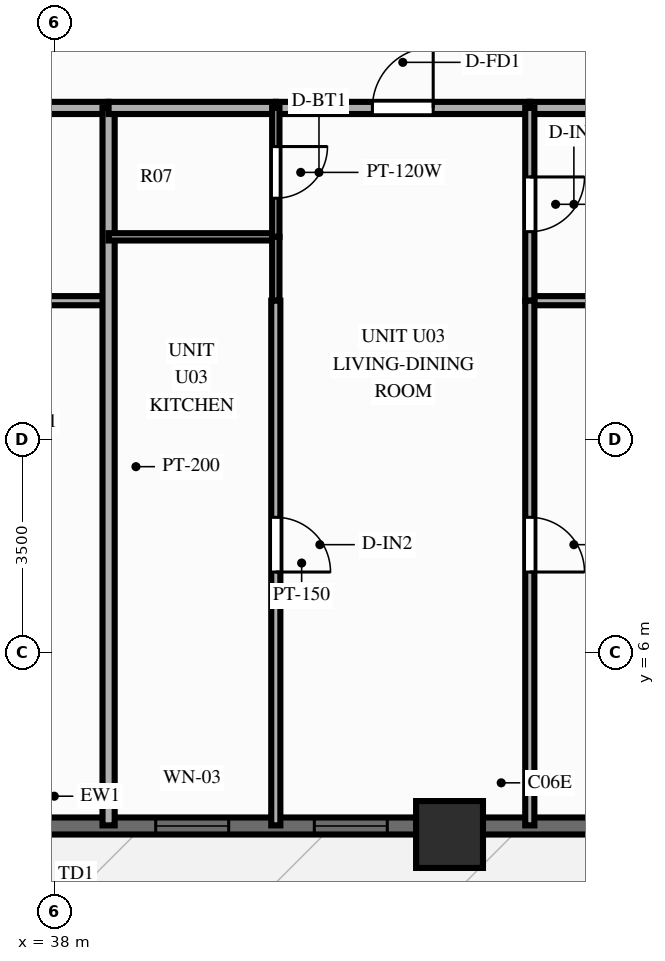
"""IFC4 building model, lengths in metres.
Left out: names, types, materials, properties, quantities, classifications, styles, units other than length and angle.
Written with IfcOpenShell. Run it as: python <this file> out.ifc"""

import sys

from ifc_helpers import new_model, si_unit, direction, frame, frame_2d, origin, origin_2d, place, context, subcontext, project, spatial, rectangle, extrude, source, transform, mapped, element, fill, save


model = new_model("IFC4")
c1 = context("Model", 3, precision=1e-05, world=origin(), true_north=direction((0.0, 1.0)))
c2 = subcontext(c1, "Body", "Model", "MODEL_VIEW")
j1 = project(units=[si_unit("LENGTHUNIT", "METRE"), si_unit("PLANEANGLEUNIT", "RADIAN")], contexts=[c1])
p1 = place(None, origin())
s1 = spatial("IfcSite", under=j1, at=p1, CompositionType="ELEMENT")
p2 = place(p1, origin())
s2 = spatial("IfcBuilding", under=s1, at=p2, CompositionType="ELEMENT")
p3 = place(p2, frame((0.0, 0.0, 34.4)))
s3 = spatial("IfcBuildingStorey", under=s2, at=p3, CompositionType="ELEMENT", Elevation=34.4)
m1 = source(origin(), c2, "Body", "SweptSolid", [
    extrude(rectangle(XDim=1.1, YDim=1.1, at=origin_2d()), origin(), (0.0, 0.0, 1.0), 3.0),
])
p4 = place(p3, frame((44.5, 3.0, 0.0), z_axis=(0.0, 0.0, 1.0), x_axis=(1.0, 0.0, 0.0)))
e1 = element("IfcColumn", 1, at=p4, inside=s3, PredefinedType="COLUMN", context=c2, shape_type="MappedRepresentation", body=[
    mapped(m1, transform((0.0, 0.0, 0.0), scale=1.0)),
])
p5 = place(p3, frame((15.5, 3.14, 0.0), z_axis=(0.0, 0.0, 1.0), x_axis=(1.0, 0.0, 0.0)))
e2 = element("IfcWall", 2, at=p5, inside=s3, PredefinedType="SOLIDWALL", context=c2, shape_type="SweptSolid", body=[
    extrude(rectangle(XDim=45.0, YDim=0.28, at=frame_2d((22.5, 0.0))), origin(), (0.0, 0.0, 1.0), 2.28),
])
p6 = place(p5, frame((1.06, 0.0, 0.25)))
e3 = element("IfcOpeningElement", 3, at=p6, cuts=e2, PredefinedType="OPENING", context=c2, shape_type="SweptSolid", body=[
    extrude(rectangle(XDim=1.2, YDim=1.5, at=frame_2d((0.6, 0.75))), frame((0.0, 0.152, 0.0), z_axis=(0.0, -1.0, 0.0), x_axis=(1.0, 0.0, 0.0)), (0.0, 0.0, 1.0), 0.304),
])
p7 = place(p5, frame((4.875, 0.0, 0.25)))
e4 = element("IfcOpeningElement", 4, at=p7, cuts=e2, PredefinedType="OPENING", context=c2, shape_type="SweptSolid", body=[
    extrude(rectangle(XDim=1.2, YDim=1.5, at=frame_2d((0.6, 0.75))), frame((0.0, 0.152, 0.0), z_axis=(0.0, -1.0, 0.0), x_axis=(1.0, 0.0, 0.0)), (0.0, 0.0, 1.0), 0.304),
])
p8 = place(p5, frame((9.303, 0.0, 0.25)))
e5 = element("IfcOpeningElement", 5, at=p8, cuts=e2, PredefinedType="OPENING", context=c2, shape_type="SweptSolid", body=[
    extrude(rectangle(XDim=1.2, YDim=1.5, at=frame_2d((0.6, 0.75))), frame((0.0, 0.152, 0.0), z_axis=(0.0, -1.0, 0.0), x_axis=(1.0, 0.0, 0.0)), (0.0, 0.0, 1.0), 0.304),
])
p9 = place(p5, frame((13.098, 0.0, 0.25)))
e6 = element("IfcOpeningElement", 6, at=p9, cuts=e2, PredefinedType="OPENING", context=c2, shape_type="SweptSolid", body=[
    extrude(rectangle(XDim=1.2, YDim=1.5, at=frame_2d((0.6, 0.75))), frame((0.0, 0.152, 0.0), z_axis=(0.0, -1.0, 0.0), x_axis=(1.0, 0.0, 0.0)), (0.0, 0.0, 1.0), 0.304),
])
p10 = place(p5, frame((17.408, 0.0, 0.25)))
e7 = element("IfcOpeningElement", 7, at=p10, cuts=e2, PredefinedType="OPENING", context=c2, shape_type="SweptSolid", body=[
    extrude(rectangle(XDim=1.2, YDim=1.5, at=frame_2d((0.6, 0.75))), frame((0.0, 0.152, 0.0), z_axis=(0.0, -1.0, 0.0), x_axis=(1.0, 0.0, 0.0)), (0.0, 0.0, 1.0), 0.304),
])
p11 = place(p5, frame((22.06, 0.0, 0.0), z_axis=(0.0, 0.0, 1.0), x_axis=(-1.0, 0.0, 0.0)))
e8 = element("IfcOpeningElement", 8, at=p11, cuts=e2, PredefinedType="OPENING", context=c2, shape_type="SweptSolid", body=[
    extrude(rectangle(XDim=1.1, YDim=2.15, at=frame_2d((0.55, 1.075))), frame((0.0, 0.152, 0.0), z_axis=(0.0, -1.0, 0.0), x_axis=(1.0, 0.0, 0.0)), (0.0, 0.0, 1.0), 0.304),
])
p12 = place(p5, frame((24.168, 0.0, 0.25)))
e9 = element("IfcOpeningElement", 9, at=p12, cuts=e2, PredefinedType="OPENING", context=c2, shape_type="SweptSolid", body=[
    extrude(rectangle(XDim=1.2, YDim=1.5, at=frame_2d((0.6, 0.75))), frame((0.0, 0.152, 0.0), z_axis=(0.0, -1.0, 0.0), x_axis=(1.0, 0.0, 0.0)), (0.0, 0.0, 1.0), 0.304),
])
p13 = place(p5, frame((26.776, 0.0, 0.25)))
e10 = element("IfcOpeningElement", 10, at=p13, cuts=e2, PredefinedType="OPENING", context=c2, shape_type="SweptSolid", body=[
    extrude(rectangle(XDim=1.2, YDim=1.5, at=frame_2d((0.6, 0.75))), frame((0.0, 0.152, 0.0), z_axis=(0.0, -1.0, 0.0), x_axis=(1.0, 0.0, 0.0)), (0.0, 0.0, 1.0), 0.304),
])
p14 = place(p5, frame((31.613, 0.0, 0.25)))
e11 = element("IfcOpeningElement", 11, at=p14, cuts=e2, PredefinedType="OPENING", context=c2, shape_type="SweptSolid", body=[
    extrude(rectangle(XDim=1.2, YDim=1.5, at=frame_2d((0.6, 0.75))), frame((0.0, 0.152, 0.0), z_axis=(0.0, -1.0, 0.0), x_axis=(1.0, 0.0, 0.0)), (0.0, 0.0, 1.0), 0.304),
])
p15 = place(p5, frame((34.881, 0.0, 0.25)))
e12 = element("IfcOpeningElement", 12, at=p15, cuts=e2, PredefinedType="OPENING", context=c2, shape_type="SweptSolid", body=[
    extrude(rectangle(XDim=1.2, YDim=1.5, at=frame_2d((0.6, 0.75))), frame((0.0, 0.152, 0.0), z_axis=(0.0, -1.0, 0.0), x_axis=(1.0, 0.0, 0.0)), (0.0, 0.0, 1.0), 0.304),
])
p16 = place(p5, frame((38.355, 0.0, 0.25)))
e13 = element("IfcOpeningElement", 13, at=p16, cuts=e2, PredefinedType="OPENING", context=c2, shape_type="SweptSolid", body=[
    extrude(rectangle(XDim=1.2, YDim=1.5, at=frame_2d((0.6, 0.75))), frame((0.0, 0.152, 0.0), z_axis=(0.0, -1.0, 0.0), x_axis=(1.0, 0.0, 0.0)), (0.0, 0.0, 1.0), 0.304),
])
p17 = place(p5, frame((42.232, 0.0, 0.25)))
e14 = element("IfcOpeningElement", 14, at=p17, cuts=e2, PredefinedType="OPENING", context=c2, shape_type="SweptSolid", body=[
    extrude(rectangle(XDim=1.2, YDim=1.5, at=frame_2d((0.6, 0.75))), frame((0.0, 0.152, 0.0), z_axis=(0.0, -1.0, 0.0), x_axis=(1.0, 0.0, 0.0)), (0.0, 0.0, 1.0), 0.304),
])
p18 = place(p3, frame((35.127, 14.95, 0.0), z_axis=(0.0, 0.0, 1.0), x_axis=(1.0, 0.0, 0.0)))
e15 = element("IfcWall", 15, at=p18, inside=s3, PredefinedType="PARTITIONING", context=c2, shape_type="SweptSolid", body=[
    extrude(rectangle(XDim=3.766, YDim=0.2, at=frame_2d((1.883, 0.0))), origin(), (0.0, 0.0, 1.0), 2.79),
])
p19 = place(p3, frame((35.127, 11.78, 0.0), z_axis=(0.0, 0.0, 1.0), x_axis=(1.0, 0.0, 0.0)))
e16 = element("IfcWall", 16, at=p19, inside=s3, PredefinedType="PARTITIONING", context=c2, shape_type="SweptSolid", body=[
    extrude(rectangle(XDim=3.766, YDim=0.15, at=frame_2d((1.883, 0.0))), origin(), (0.0, 0.0, 1.0), 2.79),
])
p20 = place(p3, frame((38.893, 14.95, 0.0), z_axis=(0.0, 0.0, 1.0), x_axis=(0.0, -1.0, 0.0)))
e17 = element("IfcWall", 17, at=p20, inside=s3, PredefinedType="PARTITIONING", context=c2, shape_type="SweptSolid", body=[
    extrude(rectangle(XDim=11.8, YDim=0.2, at=frame_2d((5.9, 0.0))), origin(), (0.0, 0.0, 1.0), 2.79),
])
p21 = place(p3, frame((38.893, 14.95, 0.0), z_axis=(0.0, 0.0, 1.0), x_axis=(1.0, 0.0, 0.0)))
e18 = element("IfcWall", 18, at=p21, inside=s3, PredefinedType="PARTITIONING", context=c2, shape_type="SweptSolid", body=[
    extrude(rectangle(XDim=2.75, YDim=0.2, at=frame_2d((1.375, 0.0))), origin(), (0.0, 0.0, 1.0), 2.79),
])
p22 = place(p3, frame((41.643, 14.95, 0.0), z_axis=(0.0, 0.0, 1.0), x_axis=(1.0, 0.0, 0.0)))
e19 = element("IfcWall", 19, at=p22, inside=s3, PredefinedType="PARTITIONING", context=c2, shape_type="SweptSolid", body=[
    extrude(rectangle(XDim=4.177, YDim=0.2, at=frame_2d((2.089, 0.0))), origin(), (0.0, 0.0, 1.0), 2.79),
])
p23 = place(p22, frame((1.589, 0.0, 0.0)))
e20 = element("IfcOpeningElement", 20, at=p23, cuts=e19, PredefinedType="OPENING", context=c2, shape_type="SweptSolid", body=[
    extrude(rectangle(XDim=1.0, YDim=2.15, at=frame_2d((0.5, 1.075))), frame((0.0, 0.112, 0.0), z_axis=(0.0, -1.0, 0.0), x_axis=(1.0, 0.0, 0.0)), (0.0, 0.0, 1.0), 0.224),
])
p24 = place(p3, frame((45.82, 14.95, 0.0), z_axis=(0.0, 0.0, 1.0), x_axis=(1.0, 0.0, 0.0)))
e21 = element("IfcWall", 21, at=p24, inside=s3, PredefinedType="PARTITIONING", context=c2, shape_type="SweptSolid", body=[
    extrude(rectangle(XDim=3.786, YDim=0.2, at=frame_2d((1.893, 0.0))), origin(), (0.0, 0.0, 1.0), 2.79),
])
p25 = place(p3, frame((38.893, 12.83, 0.0), z_axis=(0.0, 0.0, 1.0), x_axis=(1.0, 0.0, 0.0)))
e22 = element("IfcWall", 22, at=p25, inside=s3, PredefinedType="PARTITIONING", context=c2, shape_type="SweptSolid", body=[
    extrude(rectangle(XDim=2.75, YDim=0.12, at=frame_2d((1.375, 0.0))), origin(), (0.0, 0.0, 1.0), 2.79),
])
p26 = place(p3, frame((45.82, 11.78, 0.0), z_axis=(0.0, 0.0, 1.0), x_axis=(1.0, 0.0, 0.0)))
e23 = element("IfcWall", 23, at=p26, inside=s3, PredefinedType="PARTITIONING", context=c2, shape_type="SweptSolid", body=[
    extrude(rectangle(XDim=3.786, YDim=0.15, at=frame_2d((1.893, 0.0))), origin(), (0.0, 0.0, 1.0), 2.79),
])
p27 = place(p3, frame((41.643, 14.95, 0.0), z_axis=(0.0, 0.0, 1.0), x_axis=(0.0, -1.0, 0.0)))
e24 = element("IfcWall", 24, at=p27, inside=s3, PredefinedType="PARTITIONING", context=c2, shape_type="SweptSolid", body=[
    extrude(rectangle(XDim=2.12, YDim=0.12, at=frame_2d((1.06, 0.0))), origin(), (0.0, 0.0, 1.0), 2.79),
])
p28 = place(p27, frame((0.635, 0.0, 0.0)))
e25 = element("IfcOpeningElement", 25, at=p28, cuts=e24, PredefinedType="OPENING", context=c2, shape_type="SweptSolid", body=[
    extrude(rectangle(XDim=0.85, YDim=2.05, at=frame_2d((0.425, 1.025))), frame((0.0, 0.072, 0.0), z_axis=(0.0, -1.0, 0.0), x_axis=(1.0, 0.0, 0.0)), (0.0, 0.0, 1.0), 0.144),
])
p29 = place(p3, frame((41.643, 12.83, 0.0), z_axis=(0.0, 0.0, 1.0), x_axis=(0.0, -1.0, 0.0)))
e26 = element("IfcWall", 26, at=p29, inside=s3, PredefinedType="PARTITIONING", context=c2, shape_type="SweptSolid", body=[
    extrude(rectangle(XDim=1.05, YDim=0.12, at=frame_2d((0.525, 0.0))), origin(), (0.0, 0.0, 1.0), 2.79),
])
p30 = place(p3, frame((41.643, 11.78, 0.0), z_axis=(0.0, 0.0, 1.0), x_axis=(0.0, -1.0, 0.0)))
e27 = element("IfcWall", 27, at=p30, inside=s3, PredefinedType="PARTITIONING", context=c2, shape_type="SweptSolid", body=[
    extrude(rectangle(XDim=8.63, YDim=0.15, at=frame_2d((4.315, 0.0))), origin(), (0.0, 0.0, 1.0), 2.79),
])
p31 = place(p30, frame((3.563, 0.0, 0.0)))
e28 = element("IfcOpeningElement", 28, at=p31, cuts=e27, PredefinedType="OPENING", context=c2, shape_type="SweptSolid", body=[
    extrude(rectangle(XDim=0.9, YDim=2.1, at=frame_2d((0.45, 1.05))), frame((0.0, 0.087, 0.0), z_axis=(0.0, -1.0, 0.0), x_axis=(1.0, 0.0, 0.0)), (0.0, 0.0, 1.0), 0.174),
])
p32 = place(p3, frame((45.82, 14.95, 0.0), z_axis=(0.0, 0.0, 1.0), x_axis=(0.0, -1.0, 0.0)))
e29 = element("IfcWall", 29, at=p32, inside=s3, PredefinedType="PARTITIONING", context=c2, shape_type="SweptSolid", body=[
    extrude(rectangle(XDim=3.17, YDim=0.15, at=frame_2d((1.585, 0.0))), origin(), (0.0, 0.0, 1.0), 2.79),
])
p33 = place(p32, frame((1.135, 0.0, 0.0)))
e30 = element("IfcOpeningElement", 30, at=p33, cuts=e29, PredefinedType="OPENING", context=c2, shape_type="SweptSolid", body=[
    extrude(rectangle(XDim=0.9, YDim=2.1, at=frame_2d((0.45, 1.05))), frame((0.0, 0.087, 0.0), z_axis=(0.0, -1.0, 0.0), x_axis=(1.0, 0.0, 0.0)), (0.0, 0.0, 1.0), 0.174),
])
p34 = place(p3, frame((45.82, 11.78, 0.0), z_axis=(0.0, 0.0, 1.0), x_axis=(0.0, -1.0, 0.0)))
e31 = element("IfcWall", 31, at=p34, inside=s3, PredefinedType="PARTITIONING", context=c2, shape_type="SweptSolid", body=[
    extrude(rectangle(XDim=8.63, YDim=0.15, at=frame_2d((4.315, 0.0))), origin(), (0.0, 0.0, 1.0), 2.79),
])
p35 = place(p34, frame((3.563, 0.0, 0.0)))
e32 = element("IfcOpeningElement", 32, at=p35, cuts=e31, PredefinedType="OPENING", context=c2, shape_type="SweptSolid", body=[
    extrude(rectangle(XDim=0.9, YDim=2.1, at=frame_2d((0.45, 1.05))), frame((0.0, 0.087, 0.0), z_axis=(0.0, -1.0, 0.0), x_axis=(1.0, 0.0, 0.0)), (0.0, 0.0, 1.0), 0.174),
])
m2 = source(origin(), c2, "Body", "SweptSolid", [
    extrude(rectangle(XDim=1.2, YDim=1.5, at=frame_2d((0.6, 0.75))), frame((0.0, 0.03, 0.0), z_axis=(0.0, -1.0, 0.0), x_axis=(1.0, 0.0, 0.0)), (0.0, 0.0, 1.0), 0.06),
])
p36 = place(p12, origin())
e33 = element("IfcWindow", 33, at=p36, inside=s3, PartitioningType="SINGLE_PANEL", PredefinedType="WINDOW", context=c2, shape_type="MappedRepresentation", body=[
    mapped(m2, transform((0.0, 0.0, 0.0), scale=1.0)),
])
fill(e9, e33)
p37 = place(p13, origin())
e34 = element("IfcWindow", 34, at=p37, inside=s3, PartitioningType="SINGLE_PANEL", PredefinedType="WINDOW", context=c2, shape_type="MappedRepresentation", body=[
    mapped(m2, transform((0.0, 0.0, 0.0), scale=1.0)),
])
fill(e10, e34)
m3 = source(origin(), c2, "Body", "SweptSolid", [
    extrude(rectangle(XDim=1.0, YDim=2.15, at=frame_2d((0.5, 1.075))), frame((0.0, 0.025, 0.0), z_axis=(0.0, -1.0, 0.0), x_axis=(1.0, 0.0, 0.0)), (0.0, 0.0, 1.0), 0.05),
])
p38 = place(p23, origin())
e35 = element("IfcDoor", 35, at=p38, inside=s3, OperationType="SINGLE_SWING_RIGHT", PredefinedType="DOOR", context=c2, shape_type="MappedRepresentation", body=[
    mapped(m3, transform((0.0, 0.0, 0.0), scale=1.0)),
])
fill(e20, e35)
m4 = source(origin(), c2, "Body", "SweptSolid", [
    extrude(rectangle(XDim=0.85, YDim=2.05, at=frame_2d((0.425, 1.025))), frame((0.0, 0.025, 0.0), z_axis=(0.0, -1.0, 0.0), x_axis=(1.0, 0.0, 0.0)), (0.0, 0.0, 1.0), 0.05),
])
p39 = place(p28, origin())
e36 = element("IfcDoor", 36, at=p39, inside=s3, OperationType="SINGLE_SWING_LEFT", PredefinedType="DOOR", context=c2, shape_type="MappedRepresentation", body=[
    mapped(m4, transform((0.0, 0.0, 0.0), scale=1.0)),
])
fill(e25, e36)
m5 = source(origin(), c2, "Body", "SweptSolid", [
    extrude(rectangle(XDim=0.9, YDim=2.1, at=frame_2d((0.45, 1.05))), frame((0.0, 0.025, 0.0), z_axis=(0.0, -1.0, 0.0), x_axis=(1.0, 0.0, 0.0)), (0.0, 0.0, 1.0), 0.05),
])
p40 = place(p31, origin())
e37 = element("IfcDoor", 37, at=p40, inside=s3, OperationType="SINGLE_SWING_RIGHT", PredefinedType="DOOR", context=c2, shape_type="MappedRepresentation", body=[
    mapped(m5, transform((0.0, 0.0, 0.0), scale=1.0)),
])
fill(e28, e37)
p41 = place(p33, origin())
e38 = element("IfcDoor", 38, at=p41, inside=s3, OperationType="SINGLE_SWING_LEFT", PredefinedType="DOOR", context=c2, shape_type="MappedRepresentation", body=[
    mapped(m5, transform((0.0, 0.0, 0.0), scale=1.0)),
])
fill(e30, e38)
p42 = place(p35, origin())
e39 = element("IfcDoor", 39, at=p42, inside=s3, OperationType="SINGLE_SWING_RIGHT", PredefinedType="DOOR", context=c2, shape_type="MappedRepresentation", body=[
    mapped(m5, transform((0.0, 0.0, 0.0), scale=1.0)),
])
fill(e32, e39)
save(model, sys.argv[1])
